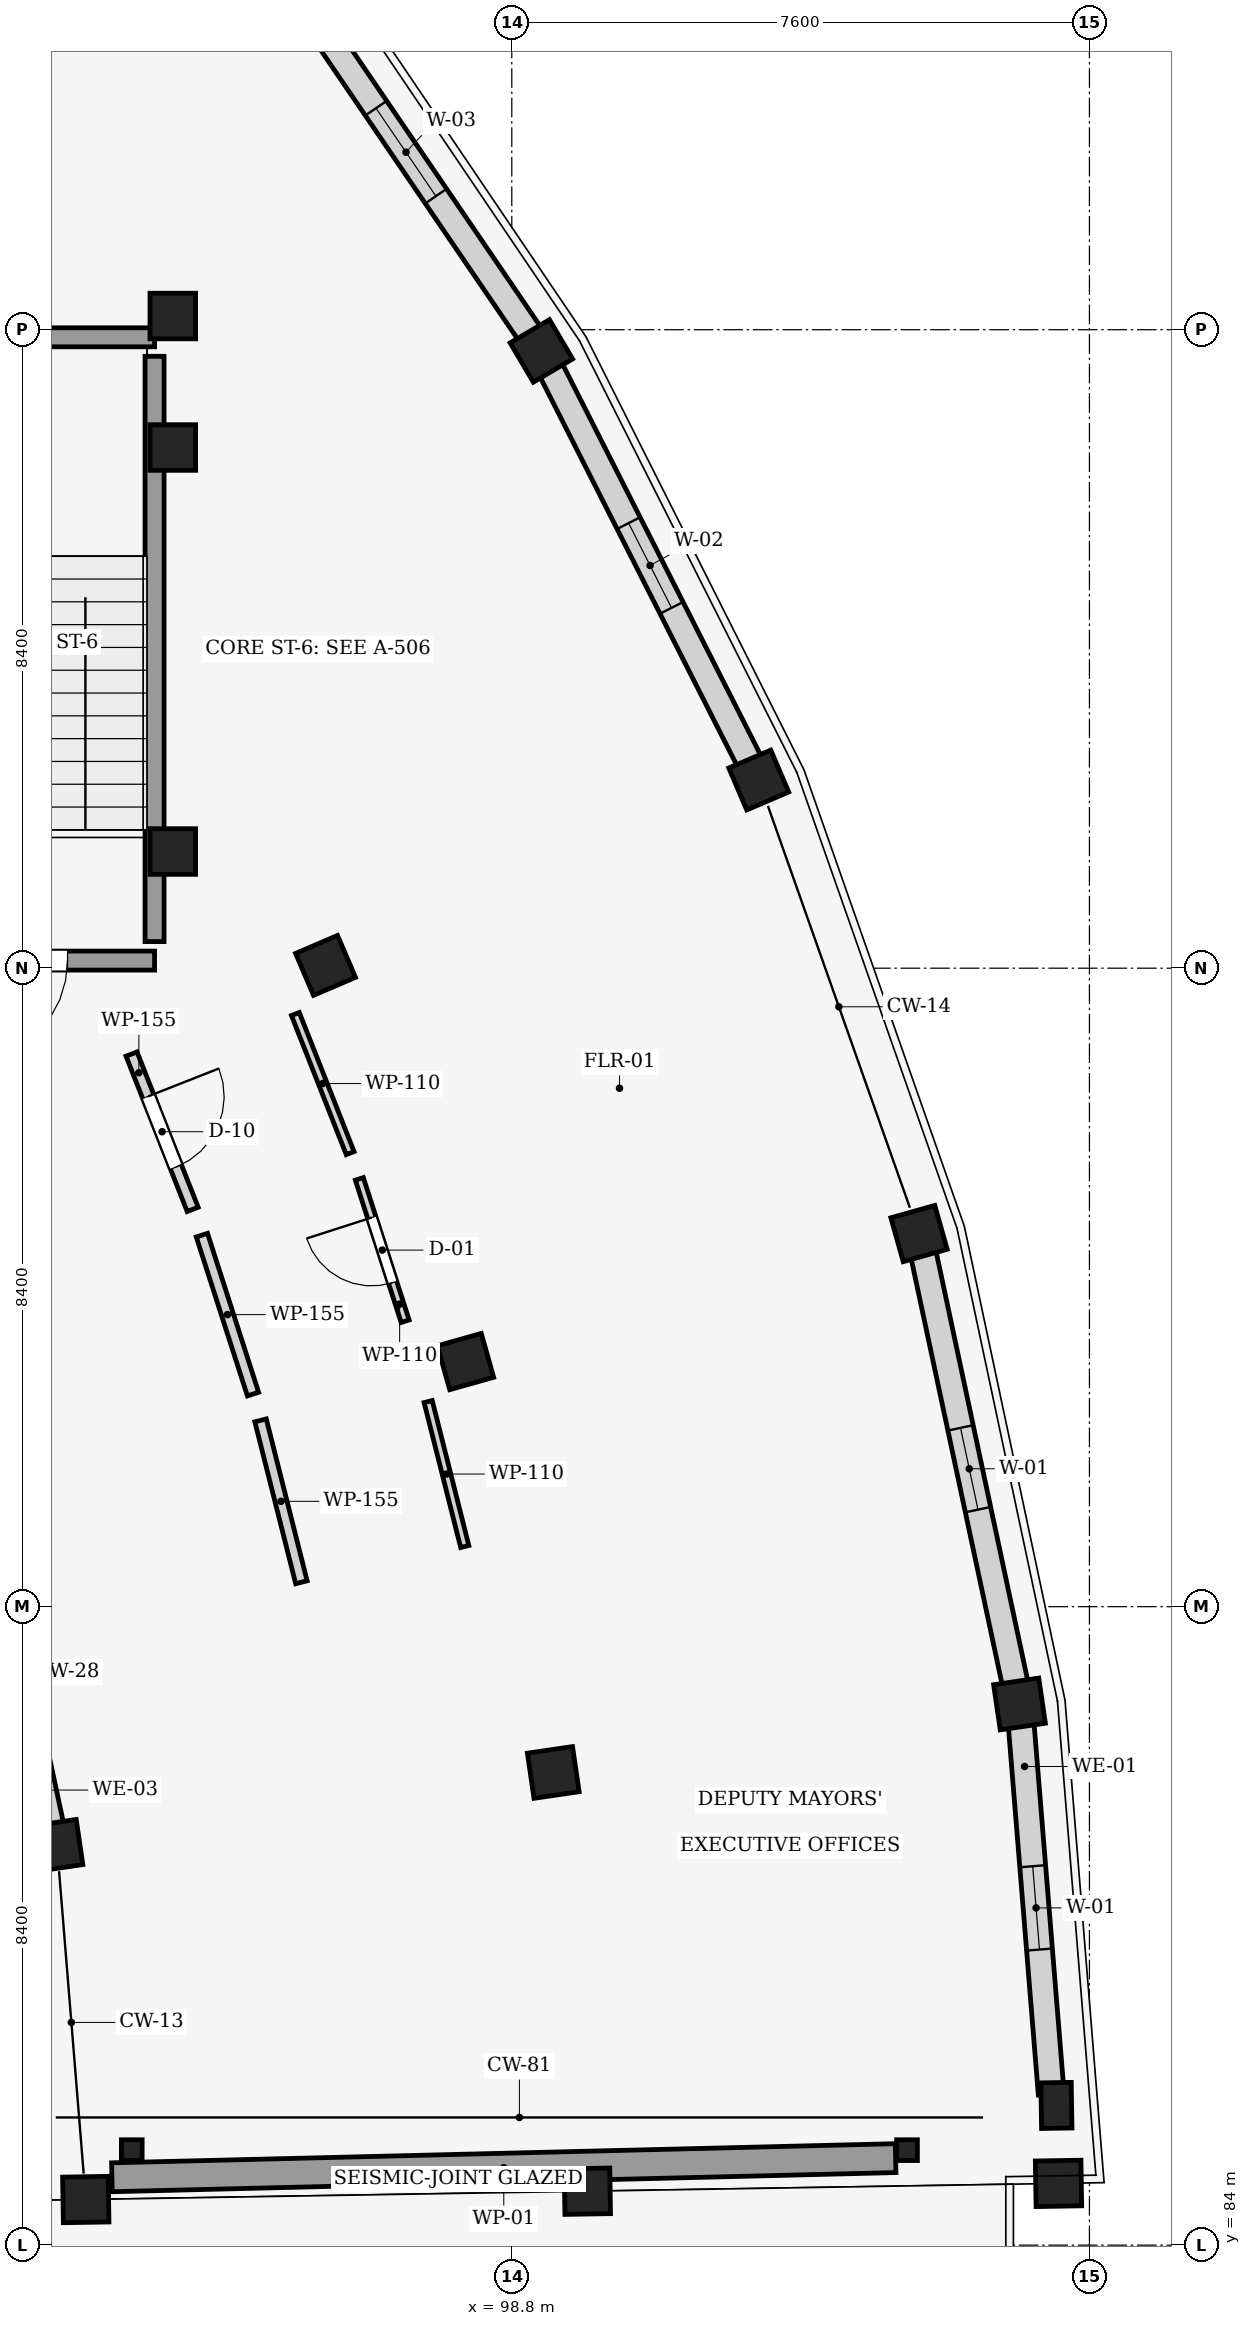
"""IFC4 building model, lengths in metres.
Left out: names, types, materials, properties, quantities, classifications, styles, units other than length and angle.
Written with IfcOpenShell. Run it as: python <this file> out.ifc"""

import sys

from ifc_helpers import new_model, si_unit, direction, frame, frame_2d, origin, origin_2d, place, context, subcontext, project, spatial, rectangle, hollow_circle, extrude, element, fill, save


model = new_model("IFC4")
c1 = context("Model", 3, precision=1e-05, world=origin(), true_north=direction((0.0, 1.0)))
c2 = subcontext(c1, "Body", "Model", "MODEL_VIEW")
j1 = project(units=[si_unit("LENGTHUNIT", "METRE"), si_unit("PLANEANGLEUNIT", "RADIAN")], contexts=[c1])
p1 = place(None, origin())
s1 = spatial("IfcSite", under=j1, at=p1, CompositionType="ELEMENT")
p2 = place(p1, origin())
s2 = spatial("IfcBuilding", under=s1, at=p2, CompositionType="ELEMENT")
p3 = place(p2, frame((0.0, 0.0, 17.25)))
s3 = spatial("IfcBuildingStorey", under=s2, at=p3, CompositionType="ELEMENT", Elevation=17.25)
for number, where, z_axis, x_axis in (
    (1, (93.195, 84.6, 0.0), (0.0, 0.0, 1.0), (1.0, 0.017, 0.0)),
    (2, (99.794, 84.71, 0.0), (0.0, 0.0, 1.0), (1.0, 0.017, 0.0)),
    (3, (105.993, 84.812, 0.0), (0.0, 0.0, 1.0), (1.0, 0.017, 0.0)),
):
    element("IfcColumn", number, at=place(p3, frame(where, z_axis=z_axis, x_axis=x_axis)), inside=s3, PredefinedType="COLUMN", context=c2, shape_type="SweptSolid", body=[
        extrude(rectangle(XDim=0.6, YDim=0.6, at=origin_2d()), origin(), (0.0, 0.0, 1.0), 4.05),
    ])
p4 = place(p3, frame((105.966, 85.838, 0.0), z_axis=(0.0, 0.0, 1.0), x_axis=(0.999862544538, 0.016579868188, 0.0)))
e4 = element("IfcColumn", 4, at=p4, inside=s3, PredefinedType="PILASTER", context=c2, shape_type="SweptSolid", body=[
    extrude(rectangle(XDim=0.4, YDim=0.6, at=origin_2d()), origin(), (0.0, 0.0, 1.0), 4.05),
])
for number, where, z_axis, x_axis in (
    (5, (92.816, 89.26, 0.0), (0.0, 0.0, 1.0), (0.989, 0.145, 0.0)),
    (6, (99.346, 90.219, 0.0), (0.0, 0.0, 1.0), (0.989, 0.145, 0.0)),
    (7, (105.48, 91.12, 0.0), (0.0, 0.0, 1.0), (0.989, 0.145, 0.0)),
    (8, (98.191, 95.625, 0.0), (0.0, 0.0, 1.0), (0.962, 0.272, 0.0)),
    (9, (104.158, 97.309, 0.0), (0.0, 0.0, 1.0), (0.962, 0.272, 0.0)),
    (10, (96.349, 100.837, 0.0), (0.0, 0.0, 1.0), (0.919, 0.393, 0.0)),
    (11, (102.049, 103.276, 0.0), (0.0, 0.0, 1.0), (0.919, 0.393, 0.0)),
    (12, (99.189, 108.921, 0.0), (0.0, 0.0, 1.0), (0.861, 0.509, 0.0)),
):
    element("IfcColumn", number, at=place(p3, frame(where, z_axis=z_axis, x_axis=x_axis)), inside=s3, PredefinedType="COLUMN", context=c2, shape_type="SweptSolid", body=[
        extrude(rectangle(XDim=0.6, YDim=0.6, at=origin_2d()), origin(), (0.0, 0.0, 1.0), 4.05),
    ])
for number, where, z_axis, x_axis in (
    (13, (104.0, 85.25, 0.0), (0.0, 0.0, 1.0), (1.0, 0.0, 0.0)),
    (14, (93.8, 85.25, 0.0), (0.0, 0.0, 1.0), (1.0, 0.0, 0.0)),
):
    element("IfcColumn", number, at=place(p3, frame(where, z_axis=z_axis, x_axis=x_axis)), inside=s3, PredefinedType="COLUMN", context=c2, shape_type="SweptSolid", body=[
        extrude(hollow_circle(Radius=0.136, WallThickness=0.016, at=origin_2d()), origin(), (0.0, 0.0, 1.0), 3.82),
    ])
for number, where, z_axis, x_axis in (
    (15, (94.34, 102.335, 0.0), (0.0, 0.0, 1.0), (1.0, 0.0, 0.0)),
    (16, (94.34, 107.65, 0.0), (0.0, 0.0, 1.0), (1.0, 0.0, 0.0)),
    (17, (94.34, 109.38, 0.0), (0.0, 0.0, 1.0), (1.0, 0.0, 0.0)),
):
    element("IfcColumn", number, at=place(p3, frame(where, z_axis=z_axis, x_axis=x_axis)), inside=s3, PredefinedType="COLUMN", context=c2, shape_type="SweptSolid", body=[
        extrude(rectangle(XDim=0.6, YDim=0.6, at=origin_2d()), origin(), (0.0, 0.0, 1.0), 4.05),
    ])
p5 = place(p3, frame((105.499, 90.885, 0.0), z_axis=(0.0, 0.0, 1.0), x_axis=(0.081149437974, -0.996701945777, 0.0)))
e18 = element("IfcWall", 18, at=p5, inside=s3, PredefinedType="STANDARD", context=c2, shape_type="SweptSolid", body=[
    extrude(rectangle(XDim=4.913, YDim=0.34, at=frame_2d((2.457, 0.0))), origin(), (0.0, 0.0, 1.0), 2.935),
])
p6 = place(p5, frame((1.906, 0.0, 0.85)))
e19 = element("IfcOpeningElement", 19, at=p6, cuts=e18, PredefinedType="OPENING", context=c2, shape_type="SweptSolid", body=[
    extrude(rectangle(XDim=1.1, YDim=1.35, at=frame_2d((0.55, 0.675))), frame((0.0, 0.18, 0.0), z_axis=(0.0, -1.0, 0.0), x_axis=(1.0, 0.0, 0.0)), (0.0, 0.0, 1.0), 0.36),
])
p7 = place(p3, frame((104.208, 97.074, 0.0), z_axis=(0.0, 0.0, 1.0), x_axis=(0.208873267346, -0.977942717233, 0.0)))
e20 = element("IfcWall", 20, at=p7, inside=s3, PredefinedType="STANDARD", context=c2, shape_type="SweptSolid", body=[
    extrude(rectangle(XDim=5.848, YDim=0.34, at=frame_2d((2.924, 0.0))), origin(), (0.0, 0.0, 1.0), 2.45),
])
p8 = place(p7, frame((2.374, 0.0, 0.85)))
e21 = element("IfcOpeningElement", 21, at=p8, cuts=e20, PredefinedType="OPENING", context=c2, shape_type="SweptSolid", body=[
    extrude(rectangle(XDim=1.1, YDim=1.35, at=frame_2d((0.55, 0.675))), frame((0.0, 0.18, 0.0), z_axis=(0.0, -1.0, 0.0), x_axis=(1.0, 0.0, 0.0)), (0.0, 0.0, 1.0), 0.36),
])
p9 = place(p3, frame((92.766, 89.495, 0.0), z_axis=(0.0, 0.0, 1.0), x_axis=(-0.208893062569, 0.977938489073, 0.0)))
e22 = element("IfcWall", 22, at=p9, inside=s3, PredefinedType="STANDARD", context=c2, shape_type="SweptSolid", body=[
    extrude(rectangle(XDim=4.195, YDim=0.29, at=frame_2d((2.097, 0.0))), origin(), (0.0, 0.0, 1.0), 2.935),
])
p10 = place(p9, frame((1.097, 0.0, 0.85)))
e23 = element("IfcOpeningElement", 23, at=p10, cuts=e22, PredefinedType="OPENING", context=c2, shape_type="SweptSolid", body=[
    extrude(rectangle(XDim=2.0, YDim=1.85, at=frame_2d((1.0, 0.925))), frame((0.0, 0.155, 0.0), z_axis=(0.0, -1.0, 0.0), x_axis=(1.0, 0.0, 0.0)), (0.0, 0.0, 1.0), 0.31),
])
p11 = place(p3, frame((99.309, 108.686, 0.0), z_axis=(0.0, 0.0, 1.0), x_axis=(0.451920591159, -0.892058170349, 0.0)))
e24 = element("IfcWall", 24, at=p11, inside=s3, PredefinedType="STANDARD", context=c2, shape_type="SweptSolid", body=[
    extrude(rectangle(XDim=5.802, YDim=0.34, at=frame_2d((2.901, 0.0))), origin(), (0.0, 0.0, 1.0), 2.935),
])
p12 = place(p11, frame((2.276, 0.0, 0.85)))
e25 = element("IfcOpeningElement", 25, at=p12, cuts=e24, PredefinedType="OPENING", context=c2, shape_type="SweptSolid", body=[
    extrude(rectangle(XDim=1.25, YDim=1.35, at=frame_2d((0.625, 0.675))), frame((0.0, 0.18, 0.0), z_axis=(0.0, -1.0, 0.0), x_axis=(1.0, 0.0, 0.0)), (0.0, 0.0, 1.0), 0.36),
])
p13 = place(p3, frame((95.786, 113.916, 0.0), z_axis=(0.0, 0.0, 1.0), x_axis=(0.563132935525, -0.826366321269, 0.0)))
e26 = element("IfcWall", 26, at=p13, inside=s3, PredefinedType="STANDARD", context=c2, shape_type="SweptSolid", body=[
    extrude(rectangle(XDim=5.76, YDim=0.34, at=frame_2d((2.88, 0.0))), origin(), (0.0, 0.0, 1.0), 2.935),
])
p14 = place(p13, frame((2.18, 0.0, 0.85)))
e27 = element("IfcOpeningElement", 27, at=p14, cuts=e26, PredefinedType="OPENING", context=c2, shape_type="SweptSolid", body=[
    extrude(rectangle(XDim=1.4, YDim=1.35, at=frame_2d((0.7, 0.675))), frame((0.0, 0.18, 0.0), z_axis=(0.0, -1.0, 0.0), x_axis=(1.0, 0.0, 0.0)), (0.0, 0.0, 1.0), 0.36),
])
p15 = place(p3, frame((103.85, 85.145, 0.0), z_axis=(0.0, 0.0, 1.0), x_axis=(-0.999701591947, -0.024427997417, 0.0)))
e28 = element("IfcWall", 28, at=p15, inside=s3, PredefinedType="SHEAR", context=c2, shape_type="SweptSolid", body=[
    extrude(rectangle(XDim=10.314, YDim=0.38, at=frame_2d((5.157, 0.0))), origin(), (0.0, 0.0, 1.0), 3.75),
])
p16 = place(p3, frame((94.1, 100.9, 0.0), z_axis=(0.0, 0.0, 1.0), x_axis=(-1.0, 0.0, 0.0)))
e29 = element("IfcWall", 29, at=p16, inside=s3, PredefinedType="SHEAR", context=c2, shape_type="SweptSolid", body=[
    extrude(rectangle(XDim=3.64, YDim=0.25, at=frame_2d((1.82, 0.0))), origin(), (0.0, 0.0, 1.0), 4.05),
])
p17 = place(p16, frame((1.145, 0.0, 0.0)))
e30 = element("IfcOpeningElement", 30, at=p17, cuts=e29, PredefinedType="OPENING", context=c2, shape_type="SweptSolid", body=[
    extrude(rectangle(XDim=1.35, YDim=2.2, at=frame_2d((0.675, 1.1))), frame((0.0, 0.135, 0.0), z_axis=(0.0, -1.0, 0.0), x_axis=(1.0, 0.0, 0.0)), (0.0, 0.0, 1.0), 0.27),
])
p18 = place(p3, frame((90.46, 109.1, 0.0), z_axis=(0.0, 0.0, 1.0), x_axis=(1.0, 0.0, 0.0)))
e31 = element("IfcWall", 31, at=p18, inside=s3, PredefinedType="SHEAR", context=c2, shape_type="SweptSolid", body=[
    extrude(rectangle(XDim=3.64, YDim=0.25, at=frame_2d((1.82, 0.0))), origin(), (0.0, 0.0, 1.0), 4.05),
])
p19 = place(p3, frame((94.1, 108.85, 0.0), z_axis=(0.0, 0.0, 1.0), x_axis=(0.0, -1.0, 0.0)))
e32 = element("IfcWall", 32, at=p19, inside=s3, PredefinedType="SHEAR", context=c2, shape_type="SweptSolid", body=[
    extrude(rectangle(XDim=7.7, YDim=0.25, at=frame_2d((3.85, 0.0))), origin(), (0.0, 0.0, 1.0), 4.05),
])
p20 = place(p3, frame((97.397, 96.156, 0.0), z_axis=(0.0, 0.0, 1.0), x_axis=(-0.306193985411, 0.951969139887, 0.0)))
e33 = element("IfcWall", 33, at=p20, inside=s3, PredefinedType="PARTITIONING", context=c2, shape_type="SweptSolid", body=[
    extrude(rectangle(XDim=1.967, YDim=0.11, at=frame_2d((0.983, 0.0))), origin(), (0.0, 0.0, 1.0), 3.62),
])
p21 = place(p20, frame((0.533, 0.0, 0.0)))
e34 = element("IfcOpeningElement", 34, at=p21, cuts=e33, PredefinedType="OPENING", context=c2, shape_type="SweptSolid", body=[
    extrude(rectangle(XDim=0.9, YDim=2.1, at=frame_2d((0.45, 1.05))), frame((0.0, 0.065, 0.0), z_axis=(0.0, -1.0, 0.0), x_axis=(1.0, 0.0, 0.0)), (0.0, 0.0, 1.0), 0.13),
])
p22 = place(p3, frame((96.673, 98.367, 0.0), z_axis=(0.0, 0.0, 1.0), x_axis=(-0.366420321181, 0.93044943346, 0.0)))
e35 = element("IfcWall", 35, at=p22, inside=s3, PredefinedType="PARTITIONING", context=c2, shape_type="SweptSolid", body=[
    extrude(rectangle(XDim=1.967, YDim=0.11, at=frame_2d((0.983, 0.0))), origin(), (0.0, 0.0, 1.0), 3.62),
])
p23 = place(p3, frame((98.181, 93.191, 0.0), z_axis=(0.0, 0.0, 1.0), x_axis=(-0.244871130076, 0.969555635152, 0.0)))
e36 = element("IfcWall", 36, at=p23, inside=s3, PredefinedType="PARTITIONING", context=c2, shape_type="SweptSolid", body=[
    extrude(rectangle(XDim=1.967, YDim=0.11, at=frame_2d((0.983, 0.0))), origin(), (0.0, 0.0, 1.0), 2.935),
])
p24 = place(p3, frame((93.797, 99.67, 0.0), z_axis=(0.0, 0.0, 1.0), x_axis=(0.366364143448, -0.930471554856, 0.0)))
e37 = element("IfcWall", 37, at=p24, inside=s3, PredefinedType="PARTITIONING", context=c2, shape_type="SweptSolid", body=[
    extrude(rectangle(XDim=2.197, YDim=0.155, at=frame_2d((1.098, 0.0))), origin(), (0.0, 0.0, 1.0), 3.62),
])
p25 = place(p24, frame((0.598, 0.0, 0.0)))
e38 = element("IfcOpeningElement", 38, at=p25, cuts=e37, PredefinedType="OPENING", context=c2, shape_type="SweptSolid", body=[
    extrude(rectangle(XDim=1.0, YDim=2.22, at=frame_2d((0.5, 1.11))), frame((0.0, 0.087, 0.0), z_axis=(0.0, -1.0, 0.0), x_axis=(1.0, 0.0, 0.0)), (0.0, 0.0, 1.0), 0.175),
])
for number, where, z_axis, x_axis in (
    (39, (94.723, 97.288, 0.0), (0.0, 0.0, 1.0), (0.306, -0.952, 0.0)),
    (40, (95.495, 94.851, 0.0), (0.0, 0.0, 1.0), (0.245, -0.97, 0.0)),
):
    element("IfcWall", number, at=place(p3, frame(where, z_axis=z_axis, x_axis=x_axis)), inside=s3, PredefinedType="PARTITIONING", context=c2, shape_type="SweptSolid", body=[
        extrude(rectangle(XDim=2.197, YDim=0.155, at=frame_2d((1.098, 0.0))), origin(), (0.0, 0.0, 1.0), 2.935),
    ])
p26 = place(p6, origin())
e41 = element("IfcWindow", 41, at=p26, inside=s3, PartitioningType="SINGLE_PANEL", PredefinedType="WINDOW", context=c2, shape_type="SweptSolid", body=[
    extrude(rectangle(XDim=1.1, YDim=1.35, at=frame_2d((0.55, 0.675))), frame((0.0, 0.03, 0.0), z_axis=(0.0, -1.0, 0.0), x_axis=(1.0, 0.0, 0.0)), (0.0, 0.0, 1.0), 0.06),
])
fill(e19, e41)
p27 = place(p8, origin())
e42 = element("IfcWindow", 42, at=p27, inside=s3, PartitioningType="SINGLE_PANEL", PredefinedType="WINDOW", context=c2, shape_type="SweptSolid", body=[
    extrude(rectangle(XDim=1.1, YDim=1.35, at=frame_2d((0.55, 0.675))), frame((0.0, 0.03, 0.0), z_axis=(0.0, -1.0, 0.0), x_axis=(1.0, 0.0, 0.0)), (0.0, 0.0, 1.0), 0.06),
])
fill(e21, e42)
p28 = place(p12, origin())
e43 = element("IfcWindow", 43, at=p28, inside=s3, PartitioningType="SINGLE_PANEL", PredefinedType="WINDOW", context=c2, shape_type="SweptSolid", body=[
    extrude(rectangle(XDim=1.25, YDim=1.35, at=frame_2d((0.625, 0.675))), frame((0.0, 0.03, 0.0), z_axis=(0.0, -1.0, 0.0), x_axis=(1.0, 0.0, 0.0)), (0.0, 0.0, 1.0), 0.06),
])
fill(e25, e43)
p29 = place(p14, origin())
e44 = element("IfcWindow", 44, at=p29, inside=s3, PartitioningType="SINGLE_PANEL", PredefinedType="WINDOW", context=c2, shape_type="SweptSolid", body=[
    extrude(rectangle(XDim=1.4, YDim=1.35, at=frame_2d((0.7, 0.675))), frame((0.0, 0.03, 0.0), z_axis=(0.0, -1.0, 0.0), x_axis=(1.0, 0.0, 0.0)), (0.0, 0.0, 1.0), 0.06),
])
fill(e27, e44)
p30 = place(p17, origin())
e45 = element("IfcDoor", 45, at=p30, inside=s3, OperationType="SINGLE_SWING_RIGHT", PredefinedType="DOOR", context=c2, shape_type="SweptSolid", body=[
    extrude(rectangle(XDim=1.35, YDim=2.2, at=frame_2d((0.675, 1.1))), frame((0.0, 0.025, 0.0), z_axis=(0.0, -1.0, 0.0), x_axis=(1.0, 0.0, 0.0)), (0.0, 0.0, 1.0), 0.05),
])
fill(e30, e45)
p31 = place(p21, origin())
e46 = element("IfcDoor", 46, at=p31, inside=s3, OperationType="SINGLE_SWING_RIGHT", PredefinedType="DOOR", context=c2, shape_type="SweptSolid", body=[
    extrude(rectangle(XDim=0.9, YDim=2.1, at=frame_2d((0.45, 1.05))), frame((0.0, 0.025, 0.0), z_axis=(0.0, -1.0, 0.0), x_axis=(1.0, 0.0, 0.0)), (0.0, 0.0, 1.0), 0.05),
])
fill(e34, e46)
p32 = place(p25, origin())
e47 = element("IfcDoor", 47, at=p32, inside=s3, OperationType="SINGLE_SWING_LEFT", PredefinedType="DOOR", context=c2, shape_type="SweptSolid", body=[
    extrude(rectangle(XDim=1.0, YDim=2.22, at=frame_2d((0.5, 1.11))), frame((0.0, 0.025, 0.0), z_axis=(0.0, -1.0, 0.0), x_axis=(1.0, 0.0, 0.0)), (0.0, 0.0, 1.0), 0.05),
])
fill(e38, e47)
save(model, sys.argv[1])
